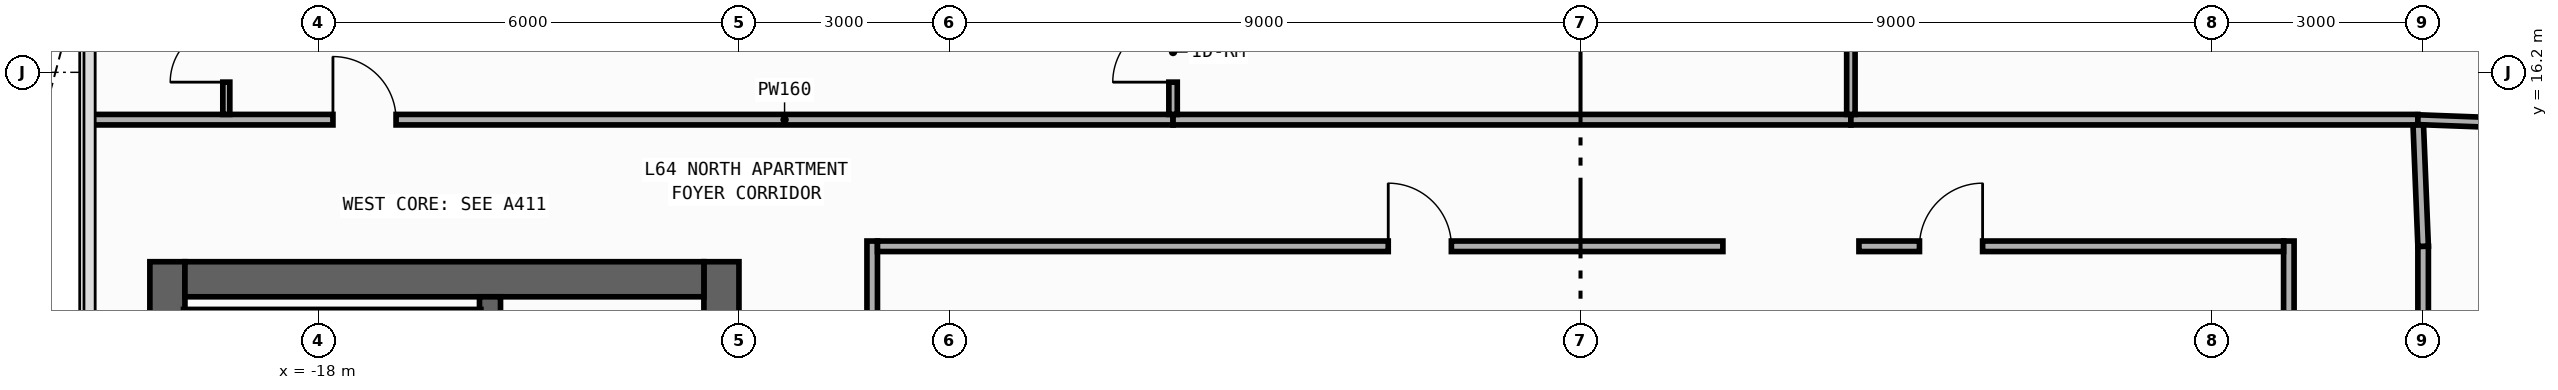
"""IFC4 building model, lengths in metres.
Left out: names, types, materials, properties, quantities, classifications, styles, units other than length and angle.
Written with IfcOpenShell. Run it as: python <this file> out.ifc"""

import sys

from ifc_helpers import new_model, si_unit, direction, frame, frame_2d, origin, place, context, subcontext, project, spatial, rectangle, extrude, element, fill, save


model = new_model("IFC4")
c1 = context("Model", 3, precision=1e-05, world=origin(), true_north=direction((0.0, 1.0)))
c2 = subcontext(c1, "Body", "Model", "MODEL_VIEW")
j1 = project(units=[si_unit("LENGTHUNIT", "METRE"), si_unit("PLANEANGLEUNIT", "RADIAN")], contexts=[c1])
p1 = place(None, origin())
s1 = spatial("IfcSite", under=j1, at=p1, CompositionType="ELEMENT")
p2 = place(p1, origin())
s2 = spatial("IfcBuilding", under=s1, at=p2, CompositionType="ELEMENT")
p3 = place(p2, frame((0.0, 0.0, 269.2)))
s3 = spatial("IfcBuildingStorey", under=s2, at=p3, CompositionType="ELEMENT", Elevation=269.2)
p4 = place(p3, frame((-20.15, -13.5, 0.0), z_axis=(0.0, 0.0, 1.0), x_axis=(0.0, 1.0, 0.0)))
e1 = element("IfcWall", 1, at=p4, inside=s3, PredefinedType="SHEAR", context=c2, shape_type="SweptSolid", body=[
    extrude(rectangle(XDim=27.0, YDim=0.5, at=frame_2d((13.5, 0.0))), origin(), (0.0, 0.0, 1.0), 3.25),
])
p5 = place(p3, frame((-12.25, -13.5, 0.0), z_axis=(0.0, 0.0, 1.0), x_axis=(0.0, 1.0, 0.0)))
e2 = element("IfcWall", 2, at=p5, inside=s3, PredefinedType="SHEAR", context=c2, shape_type="SweptSolid", body=[
    extrude(rectangle(XDim=27.0, YDim=0.5, at=frame_2d((13.5, 0.0))), origin(), (0.0, 0.0, 1.0), 3.25),
])
p6 = place(p5, frame((15.175, 0.0, 0.0)))
e3 = element("IfcOpeningElement", 3, at=p6, cuts=e2, PredefinedType="OPENING", context=c2, shape_type="SweptSolid", body=[
    extrude(rectangle(XDim=0.85, YDim=2.1, at=frame_2d((0.425, 1.05))), frame((0.0, 0.26, 0.0), z_axis=(0.0, -1.0, 0.0), x_axis=(1.0, 0.0, 0.0)), (0.0, 0.0, 1.0), 0.52),
])
p7 = place(p5, frame((21.275, 0.0, 0.0)))
e4 = element("IfcOpeningElement", 4, at=p7, cuts=e2, PredefinedType="OPENING", context=c2, shape_type="SweptSolid", body=[
    extrude(rectangle(XDim=0.85, YDim=2.1, at=frame_2d((0.425, 1.05))), frame((0.0, 0.26, 0.0), z_axis=(0.0, -1.0, 0.0), x_axis=(1.0, 0.0, 0.0)), (0.0, 0.0, 1.0), 0.52),
])
p8 = place(p5, frame((4.275, 0.0, 0.0)))
e5 = element("IfcOpeningElement", 5, at=p8, cuts=e2, PredefinedType="OPENING", context=c2, shape_type="SweptSolid", body=[
    extrude(rectangle(XDim=0.85, YDim=2.1, at=frame_2d((0.425, 1.05))), frame((0.0, 0.26, 0.0), z_axis=(0.0, -1.0, 0.0), x_axis=(1.0, 0.0, 0.0)), (0.0, 0.0, 1.0), 0.52),
])
p9 = place(p5, frame((10.275, 0.0, 0.0)))
e6 = element("IfcOpeningElement", 6, at=p9, cuts=e2, PredefinedType="OPENING", context=c2, shape_type="SweptSolid", body=[
    extrude(rectangle(XDim=0.85, YDim=2.1, at=frame_2d((0.425, 1.05))), frame((0.0, 0.26, 0.0), z_axis=(0.0, -1.0, 0.0), x_axis=(1.0, 0.0, 0.0)), (0.0, 0.0, 1.0), 0.52),
])
p10 = place(p5, frame((12.725, 0.0, 0.0)))
e7 = element("IfcOpeningElement", 7, at=p10, cuts=e2, PredefinedType="OPENING", context=c2, shape_type="SweptSolid", body=[
    extrude(rectangle(XDim=1.15, YDim=2.2, at=frame_2d((0.575, 1.1))), frame((0.0, 0.26, 0.0), z_axis=(0.0, -1.0, 0.0), x_axis=(1.0, 0.0, 0.0)), (0.0, 0.0, 1.0), 0.52),
])
p11 = place(p5, frame((1.625, 0.0, 0.0)))
e8 = element("IfcOpeningElement", 8, at=p11, cuts=e2, PredefinedType="OPENING", context=c2, shape_type="SweptSolid", body=[
    extrude(rectangle(XDim=0.85, YDim=2.1, at=frame_2d((0.425, 1.05))), frame((0.0, 0.26, 0.0), z_axis=(0.0, -1.0, 0.0), x_axis=(1.0, 0.0, 0.0)), (0.0, 0.0, 1.0), 0.52),
])
p12 = place(p3, frame((-19.9, 13.25, 0.0), z_axis=(0.0, 0.0, 1.0), x_axis=(1.0, 0.0, 0.0)))
e9 = element("IfcWall", 9, at=p12, inside=s3, PredefinedType="SHEAR", context=c2, shape_type="SweptSolid", body=[
    extrude(rectangle(XDim=7.4, YDim=0.5, at=frame_2d((3.7, 0.0))), origin(), (0.0, 0.0, 1.0), 3.25),
])
p13 = place(p3, frame((-15.55, -13.0, 0.0), z_axis=(0.0, 0.0, 1.0), x_axis=(0.0, 1.0, 0.0)))
e10 = element("IfcWall", 10, at=p13, inside=s3, PredefinedType="SHEAR", context=c2, shape_type="SweptSolid", body=[
    extrude(rectangle(XDim=26.0, YDim=0.3, at=frame_2d((13.0, 0.0))), origin(), (0.0, 0.0, 1.0), 3.25),
])
p14 = place(p13, frame((12.225, 0.0, 0.0)))
e11 = element("IfcOpeningElement", 11, at=p14, cuts=e10, PredefinedType="OPENING", context=c2, shape_type="SweptSolid", body=[
    extrude(rectangle(XDim=1.15, YDim=2.2, at=frame_2d((0.575, 1.1))), frame((0.0, 0.16, 0.0), z_axis=(0.0, -1.0, 0.0), x_axis=(1.0, 0.0, 0.0)), (0.0, 0.0, 1.0), 0.32),
])
p15 = place(p13, frame((1.125, 0.0, 0.0)))
e12 = element("IfcOpeningElement", 12, at=p15, cuts=e10, PredefinedType="OPENING", context=c2, shape_type="SweptSolid", body=[
    extrude(rectangle(XDim=0.85, YDim=2.1, at=frame_2d((0.425, 1.05))), frame((0.0, 0.16, 0.0), z_axis=(0.0, -1.0, 0.0), x_axis=(1.0, 0.0, 0.0)), (0.0, 0.0, 1.0), 0.32),
])
p16 = place(p3, frame((-19.92, 12.71, 0.0), z_axis=(0.0, 0.0, 1.0), x_axis=(1.0, 0.0, 0.0)))
e13 = element("IfcWall", 13, at=p16, inside=s3, PredefinedType="SHEAR", context=c2, shape_type="SweptSolid", body=[
    extrude(rectangle(XDim=4.24, YDim=0.22, at=frame_2d((2.12, 0.0))), origin(), (0.0, 0.0, 1.0), 3.25),
])
p17 = place(p3, frame((-10.1, 3.79, 0.0), z_axis=(0.0, 0.0, 1.0), x_axis=(0.0, 1.0, 0.0)))
e14 = element("IfcWall", 14, at=p17, inside=s3, PredefinedType="PARTITIONING", context=c2, shape_type="SweptSolid", body=[
    extrude(rectangle(XDim=10.005, YDim=0.15, at=frame_2d((5.002, 0.0))), origin(), (0.0, 0.0, 1.0), 3.25),
])
p18 = place(p17, frame((1.074, 0.0, 0.0)))
e15 = element("IfcOpeningElement", 15, at=p18, cuts=e14, PredefinedType="OPENING", context=c2, shape_type="SweptSolid", body=[
    extrude(rectangle(XDim=0.9, YDim=2.15, at=frame_2d((0.45, 1.075))), frame((0.0, 0.085, 0.0), z_axis=(0.0, -1.0, 0.0), x_axis=(1.0, 0.0, 0.0)), (0.0, 0.0, 1.0), 0.17),
])
p19 = place(p3, frame((12.015, 7.2, 0.0), z_axis=(0.0, 0.0, 1.0), x_axis=(0.0, 1.0, 0.0)))
e16 = element("IfcWall", 16, at=p19, inside=s3, PredefinedType="PARTITIONING", context=c2, shape_type="SweptSolid", body=[
    extrude(rectangle(XDim=6.52, YDim=0.15, at=frame_2d((3.26, 0.0))), origin(), (0.0, 0.0, 1.0), 3.25),
])
p20 = place(p19, frame((0.67, 0.0, 0.0)))
e17 = element("IfcOpeningElement", 17, at=p20, cuts=e16, PredefinedType="OPENING", context=c2, shape_type="SweptSolid", body=[
    extrude(rectangle(XDim=0.9, YDim=2.15, at=frame_2d((0.45, 1.075))), frame((0.0, 0.085, 0.0), z_axis=(0.0, -1.0, 0.0), x_axis=(1.0, 0.0, 0.0)), (0.0, 0.0, 1.0), 0.17),
])
p21 = place(p3, frame((10.1, 3.79, 0.0), z_axis=(0.0, 0.0, 1.0), x_axis=(0.0, 1.0, 0.0)))
e18 = element("IfcWall", 18, at=p21, inside=s3, PredefinedType="PARTITIONING", context=c2, shape_type="SweptSolid", body=[
    extrude(rectangle(XDim=10.005, YDim=0.15, at=frame_2d((5.002, 0.0))), origin(), (0.0, 0.0, 1.0), 3.25),
])
p22 = place(p21, frame((1.074, 0.0, 0.0)))
e19 = element("IfcOpeningElement", 19, at=p22, cuts=e18, PredefinedType="OPENING", context=c2, shape_type="SweptSolid", body=[
    extrude(rectangle(XDim=0.9, YDim=2.15, at=frame_2d((0.45, 1.075))), frame((0.0, 0.085, 0.0), z_axis=(0.0, -1.0, 0.0), x_axis=(1.0, 0.0, 0.0)), (0.0, 0.0, 1.0), 0.17),
])
p23 = place(p3, frame((-21.255, 15.525, 0.0), z_axis=(0.0, 0.0, 1.0), x_axis=(1.0, 0.0, 0.0)))
e20 = element("IfcWall", 20, at=p23, inside=s3, PredefinedType="PARTITIONING", context=c2, shape_type="SweptSolid", body=[
    extrude(rectangle(XDim=15.445, YDim=0.15, at=frame_2d((7.722, 0.0))), origin(), (0.0, 0.0, 1.0), 3.25),
])
p24 = place(p23, frame((3.466, 0.0, 0.0)))
e21 = element("IfcOpeningElement", 21, at=p24, cuts=e20, PredefinedType="OPENING", context=c2, shape_type="SweptSolid", body=[
    extrude(rectangle(XDim=0.9, YDim=2.15, at=frame_2d((0.45, 1.075))), frame((0.0, 0.085, 0.0), z_axis=(0.0, -1.0, 0.0), x_axis=(1.0, 0.0, 0.0)), (0.0, 0.0, 1.0), 0.17),
])
p25 = place(p3, frame((-5.81, 15.525, 0.0), z_axis=(0.0, 0.0, 1.0), x_axis=(1.0, 0.0, 0.0)))
e22 = element("IfcWall", 22, at=p25, inside=s3, PredefinedType="PARTITIONING", context=c2, shape_type="SweptSolid", body=[
    extrude(rectangle(XDim=9.665, YDim=0.15, at=frame_2d((4.833, 0.0))), origin(), (0.0, 0.0, 1.0), 3.25),
])
p26 = place(p3, frame((3.855, 15.525, 0.0), z_axis=(0.0, 0.0, 1.0), x_axis=(1.0, 0.0, 0.0)))
e23 = element("IfcWall", 23, at=p26, inside=s3, PredefinedType="PARTITIONING", context=c2, shape_type="SweptSolid", body=[
    extrude(rectangle(XDim=8.085, YDim=0.15, at=frame_2d((4.042, 0.0))), origin(), (0.0, 0.0, 1.0), 3.25),
])
p27 = place(p3, frame((12.015, 13.72, 0.0), z_axis=(0.0, 0.0, 1.0), x_axis=(-0.040046877756, 0.99919780203, 0.0)))
e24 = element("IfcWall", 24, at=p27, inside=s3, PredefinedType="PARTITIONING", context=c2, shape_type="SweptSolid", body=[
    extrude(rectangle(XDim=1.731, YDim=0.15, at=frame_2d((0.866, 0.0))), origin(), (0.0, 0.0, 1.0), 3.25),
])
p28 = place(p3, frame((-10.025, 13.72, 0.0), z_axis=(0.0, 0.0, 1.0), x_axis=(1.0, 0.0, 0.0)))
e25 = element("IfcWall", 25, at=p28, inside=s3, PredefinedType="PARTITIONING", context=c2, shape_type="SweptSolid", body=[
    extrude(rectangle(XDim=12.055, YDim=0.15, at=frame_2d((6.027, 0.0))), origin(), (0.0, 0.0, 1.0), 3.25),
])
p29 = place(p28, frame((7.283, 0.0, 0.0)))
e26 = element("IfcOpeningElement", 26, at=p29, cuts=e25, PredefinedType="OPENING", context=c2, shape_type="SweptSolid", body=[
    extrude(rectangle(XDim=0.9, YDim=2.15, at=frame_2d((0.45, 1.075))), frame((0.0, 0.085, 0.0), z_axis=(0.0, -1.0, 0.0), x_axis=(1.0, 0.0, 0.0)), (0.0, 0.0, 1.0), 0.17),
])
p30 = place(p3, frame((3.97, 13.72, 0.0), z_axis=(0.0, 0.0, 1.0), x_axis=(1.0, 0.0, 0.0)))
e27 = element("IfcWall", 27, at=p30, inside=s3, PredefinedType="PARTITIONING", context=c2, shape_type="SweptSolid", body=[
    extrude(rectangle(XDim=6.055, YDim=0.15, at=frame_2d((3.027, 0.0))), origin(), (0.0, 0.0, 1.0), 3.25),
])
p31 = place(p30, frame((0.863, 0.0, 0.0)))
e28 = element("IfcOpeningElement", 28, at=p31, cuts=e27, PredefinedType="OPENING", context=c2, shape_type="SweptSolid", body=[
    extrude(rectangle(XDim=0.9, YDim=2.15, at=frame_2d((0.45, 1.075))), frame((0.0, 0.085, 0.0), z_axis=(0.0, -1.0, 0.0), x_axis=(1.0, 0.0, 0.0)), (0.0, 0.0, 1.0), 0.17),
])
p32 = place(p3, frame((-19.31, 15.6, 0.0), z_axis=(0.0, 0.0, 1.0), x_axis=(0.0, 1.0, 0.0)))
e29 = element("IfcWall", 29, at=p32, inside=s3, PredefinedType="PARTITIONING", context=c2, shape_type="SweptSolid", body=[
    extrude(rectangle(XDim=2.5, YDim=0.1, at=frame_2d((1.25, 0.0))), origin(), (0.0, 0.0, 1.0), 3.25),
])
p33 = place(p32, frame((0.46, 0.0, 0.0)))
e30 = element("IfcOpeningElement", 30, at=p33, cuts=e29, PredefinedType="OPENING", context=c2, shape_type="SweptSolid", body=[
    extrude(rectangle(XDim=0.8, YDim=2.1, at=frame_2d((0.4, 1.05))), frame((0.0, 0.06, 0.0), z_axis=(0.0, -1.0, 0.0), x_axis=(1.0, 0.0, 0.0)), (0.0, 0.0, 1.0), 0.12),
])
p34 = place(p3, frame((-5.81, 15.6, 0.0), z_axis=(0.0, 0.0, 1.0), x_axis=(0.0, 1.0, 0.0)))
e31 = element("IfcWall", 31, at=p34, inside=s3, PredefinedType="PARTITIONING", context=c2, shape_type="SweptSolid", body=[
    extrude(rectangle(XDim=4.5, YDim=0.12, at=frame_2d((2.25, 0.0))), origin(), (0.0, 0.0, 1.0), 3.25),
])
p35 = place(p34, frame((0.46, 0.0, 0.0)))
e32 = element("IfcOpeningElement", 32, at=p35, cuts=e31, PredefinedType="OPENING", context=c2, shape_type="SweptSolid", body=[
    extrude(rectangle(XDim=0.86, YDim=2.15, at=frame_2d((0.43, 1.075))), frame((0.0, 0.07, 0.0), z_axis=(0.0, -1.0, 0.0), x_axis=(1.0, 0.0, 0.0)), (0.0, 0.0, 1.0), 0.14),
])
p36 = place(p3, frame((3.855, 15.6, 0.0), z_axis=(0.0, 0.0, 1.0), x_axis=(0.0, 1.0, 0.0)))
e33 = element("IfcWall", 33, at=p36, inside=s3, PredefinedType="PARTITIONING", context=c2, shape_type="SweptSolid", body=[
    extrude(rectangle(XDim=8.455, YDim=0.12, at=frame_2d((4.228, 0.0))), origin(), (0.0, 0.0, 1.0), 3.25),
])
p37 = place(p36, frame((7.195, 0.0, 0.0)))
e34 = element("IfcOpeningElement", 34, at=p37, cuts=e33, PredefinedType="OPENING", context=c2, shape_type="SweptSolid", body=[
    extrude(rectangle(XDim=0.8, YDim=2.1, at=frame_2d((0.4, 1.05))), frame((0.0, 0.07, 0.0), z_axis=(0.0, -1.0, 0.0), x_axis=(1.0, 0.0, 0.0)), (0.0, 0.0, 1.0), 0.14),
])
p38 = place(p3, frame((11.94, 15.525, 0.0), z_axis=(0.0, 0.0, 1.0), x_axis=(0.999304229002, -0.037296888581, 0.0)))
e35 = element("IfcWall", 35, at=p38, inside=s3, PredefinedType="PARTITIONING", context=c2, shape_type="SweptSolid", body=[
    extrude(rectangle(XDim=1.741, YDim=0.14, at=frame_2d((0.871, 0.0))), origin(), (0.0, 0.0, 1.0), 3.25),
])
p39 = place(p24, origin())
e36 = element("IfcDoor", 36, at=p39, inside=s3, OperationType="SINGLE_SWING_LEFT", PredefinedType="DOOR", context=c2, shape_type="SweptSolid", body=[
    extrude(rectangle(XDim=0.9, YDim=2.15, at=frame_2d((0.45, 1.075))), frame((0.0, 0.025, 0.0), z_axis=(0.0, -1.0, 0.0), x_axis=(1.0, 0.0, 0.0)), (0.0, 0.0, 1.0), 0.05),
])
fill(e21, e36)
p40 = place(p29, origin())
e37 = element("IfcDoor", 37, at=p40, inside=s3, OperationType="SINGLE_SWING_LEFT", PredefinedType="DOOR", context=c2, shape_type="SweptSolid", body=[
    extrude(rectangle(XDim=0.9, YDim=2.15, at=frame_2d((0.45, 1.075))), frame((0.0, 0.025, 0.0), z_axis=(0.0, -1.0, 0.0), x_axis=(1.0, 0.0, 0.0)), (0.0, 0.0, 1.0), 0.05),
])
fill(e26, e37)
p41 = place(p31, origin())
e38 = element("IfcDoor", 38, at=p41, inside=s3, OperationType="SINGLE_SWING_RIGHT", PredefinedType="DOOR", context=c2, shape_type="SweptSolid", body=[
    extrude(rectangle(XDim=0.9, YDim=2.15, at=frame_2d((0.45, 1.075))), frame((0.0, 0.025, 0.0), z_axis=(0.0, -1.0, 0.0), x_axis=(1.0, 0.0, 0.0)), (0.0, 0.0, 1.0), 0.05),
])
fill(e28, e38)
p42 = place(p33, origin())
e39 = element("IfcDoor", 39, at=p42, inside=s3, OperationType="SINGLE_SWING_LEFT", PredefinedType="DOOR", context=c2, shape_type="SweptSolid", body=[
    extrude(rectangle(XDim=0.8, YDim=2.1, at=frame_2d((0.4, 1.05))), frame((0.0, 0.025, 0.0), z_axis=(0.0, -1.0, 0.0), x_axis=(1.0, 0.0, 0.0)), (0.0, 0.0, 1.0), 0.05),
])
fill(e30, e39)
p43 = place(p35, origin())
e40 = element("IfcDoor", 40, at=p43, inside=s3, OperationType="SINGLE_SWING_LEFT", PredefinedType="DOOR", context=c2, shape_type="SweptSolid", body=[
    extrude(rectangle(XDim=0.86, YDim=2.15, at=frame_2d((0.43, 1.075))), frame((0.0, 0.025, 0.0), z_axis=(0.0, -1.0, 0.0), x_axis=(1.0, 0.0, 0.0)), (0.0, 0.0, 1.0), 0.05),
])
fill(e32, e40)
save(model, sys.argv[1])
